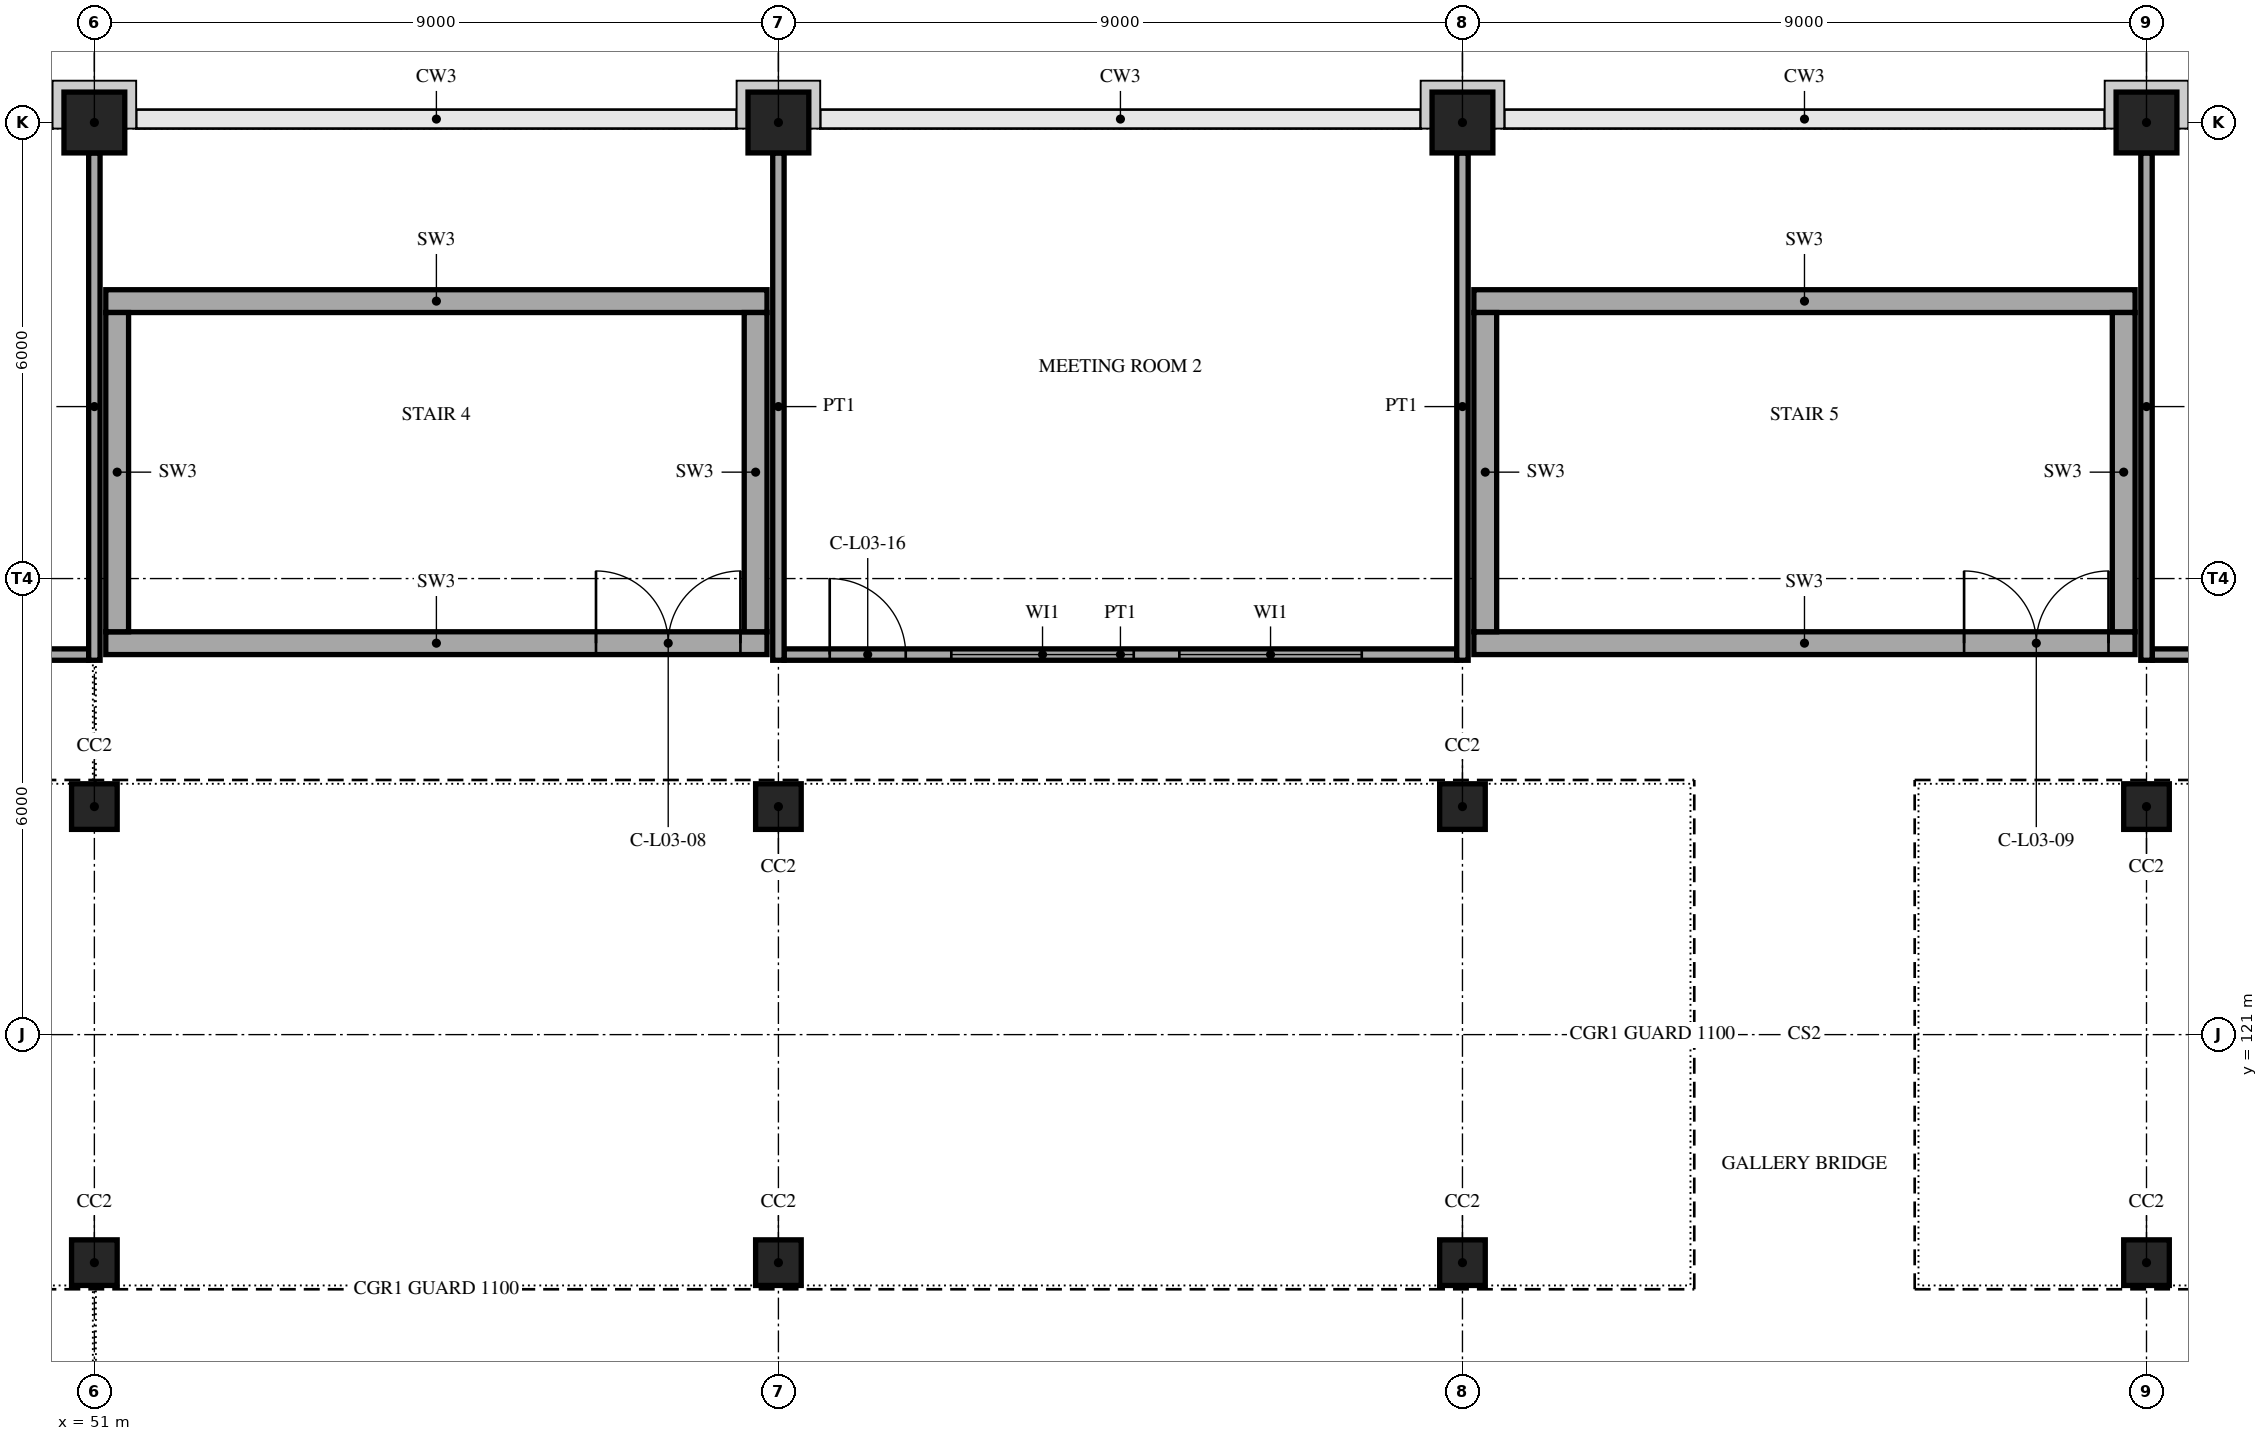
"""IFC4 building model, lengths in metres.
Left out: names, types, materials, properties, quantities, classifications, styles, units other than length and angle.
Written with IfcOpenShell. Run it as: python <this file> out.ifc"""

import sys

from ifc_helpers import new_model, si_unit, direction, frame, frame_2d, origin, origin_2d, place, context, subcontext, project, spatial, rectangle, extrude, element, fill, save


model = new_model("IFC4")
c1 = context("Model", 3, precision=1e-05, world=origin(), true_north=direction((0.0, 1.0)))
c2 = subcontext(c1, "Body", "Model", "MODEL_VIEW")
j1 = project(units=[si_unit("LENGTHUNIT", "METRE"), si_unit("PLANEANGLEUNIT", "RADIAN")], contexts=[c1])
p1 = place(None, origin())
s1 = spatial("IfcSite", under=j1, at=p1, CompositionType="ELEMENT")
p2 = place(p1, origin())
s2 = spatial("IfcBuilding", under=s1, at=p2, CompositionType="ELEMENT")
p3 = place(p2, frame((0.0, 0.0, 15.0)))
s3 = spatial("IfcBuildingStorey", under=s2, at=p3, CompositionType="ELEMENT", Elevation=15.0)
for number, where, z_axis, x_axis in (
    (1, (51.0, 118.0, 0.0), (0.0, 0.0, 1.0), (1.0, 0.0, 0.0)),
    (2, (51.0, 124.0, 0.0), (0.0, 0.0, 1.0), (1.0, 0.0, 0.0)),
):
    element("IfcColumn", number, at=place(p3, frame(where, z_axis=z_axis, x_axis=x_axis)), inside=s3, PredefinedType="COLUMN", context=c2, shape_type="SweptSolid", body=[
        extrude(rectangle(XDim=0.6, YDim=0.6, at=origin_2d()), origin(), (0.0, 0.0, 1.0), 4.2),
    ])
p4 = place(p3, frame((51.0, 133.0, 0.0), z_axis=(0.0, 0.0, 1.0), x_axis=(1.0, 0.0, 0.0)))
e3 = element("IfcColumn", 3, at=p4, inside=s3, PredefinedType="COLUMN", context=c2, shape_type="SweptSolid", body=[
    extrude(rectangle(XDim=0.8, YDim=0.8, at=origin_2d()), origin(), (0.0, 0.0, 1.0), 4.2),
])
for number, where, z_axis, x_axis in (
    (4, (60.0, 118.0, 0.0), (0.0, 0.0, 1.0), (1.0, 0.0, 0.0)),
    (5, (60.0, 124.0, 0.0), (0.0, 0.0, 1.0), (1.0, 0.0, 0.0)),
):
    element("IfcColumn", number, at=place(p3, frame(where, z_axis=z_axis, x_axis=x_axis)), inside=s3, PredefinedType="COLUMN", context=c2, shape_type="SweptSolid", body=[
        extrude(rectangle(XDim=0.6, YDim=0.6, at=origin_2d()), origin(), (0.0, 0.0, 1.0), 4.2),
    ])
p5 = place(p3, frame((60.0, 133.0, 0.0), z_axis=(0.0, 0.0, 1.0), x_axis=(1.0, 0.0, 0.0)))
e6 = element("IfcColumn", 6, at=p5, inside=s3, PredefinedType="COLUMN", context=c2, shape_type="SweptSolid", body=[
    extrude(rectangle(XDim=0.8, YDim=0.8, at=origin_2d()), origin(), (0.0, 0.0, 1.0), 4.2),
])
for number, where, z_axis, x_axis in (
    (7, (69.0, 118.0, 0.0), (0.0, 0.0, 1.0), (1.0, 0.0, 0.0)),
    (8, (69.0, 124.0, 0.0), (0.0, 0.0, 1.0), (1.0, 0.0, 0.0)),
):
    element("IfcColumn", number, at=place(p3, frame(where, z_axis=z_axis, x_axis=x_axis)), inside=s3, PredefinedType="COLUMN", context=c2, shape_type="SweptSolid", body=[
        extrude(rectangle(XDim=0.6, YDim=0.6, at=origin_2d()), origin(), (0.0, 0.0, 1.0), 4.2),
    ])
p6 = place(p3, frame((69.0, 133.0, 0.0), z_axis=(0.0, 0.0, 1.0), x_axis=(1.0, 0.0, 0.0)))
e9 = element("IfcColumn", 9, at=p6, inside=s3, PredefinedType="COLUMN", context=c2, shape_type="SweptSolid", body=[
    extrude(rectangle(XDim=0.8, YDim=0.8, at=origin_2d()), origin(), (0.0, 0.0, 1.0), 4.2),
])
for number, where, z_axis, x_axis in (
    (10, (78.0, 118.0, 0.0), (0.0, 0.0, 1.0), (1.0, 0.0, 0.0)),
    (11, (78.0, 124.0, 0.0), (0.0, 0.0, 1.0), (1.0, 0.0, 0.0)),
):
    element("IfcColumn", number, at=place(p3, frame(where, z_axis=z_axis, x_axis=x_axis)), inside=s3, PredefinedType="COLUMN", context=c2, shape_type="SweptSolid", body=[
        extrude(rectangle(XDim=0.6, YDim=0.6, at=origin_2d()), origin(), (0.0, 0.0, 1.0), 4.2),
    ])
p7 = place(p3, frame((78.0, 133.0, 0.0), z_axis=(0.0, 0.0, 1.0), x_axis=(1.0, 0.0, 0.0)))
e12 = element("IfcColumn", 12, at=p7, inside=s3, PredefinedType="COLUMN", context=c2, shape_type="SweptSolid", body=[
    extrude(rectangle(XDim=0.8, YDim=0.8, at=origin_2d()), origin(), (0.0, 0.0, 1.0), 4.2),
])
p8 = place(p3, frame((51.15, 126.15, 0.0), z_axis=(0.0, 0.0, 1.0), x_axis=(1.0, 0.0, 0.0)))
e13 = element("IfcWall", 13, at=p8, inside=s3, PredefinedType="SHEAR", context=c2, shape_type="SweptSolid", body=[
    extrude(rectangle(XDim=8.7, YDim=0.3, at=frame_2d((4.35, 0.0))), origin(), (0.0, 0.0, 1.0), 4.2),
])
p9 = place(p8, frame((6.45, 0.0, 0.0)))
e14 = element("IfcOpeningElement", 14, at=p9, cuts=e13, PredefinedType="OPENING", context=c2, shape_type="SweptSolid", body=[
    extrude(rectangle(XDim=1.9, YDim=2.1, at=frame_2d((0.95, 1.05))), frame((0.0, 0.16, 0.0), z_axis=(0.0, -1.0, 0.0), x_axis=(1.0, 0.0, 0.0)), (0.0, 0.0, 1.0), 0.32),
])
p10 = place(p3, frame((51.15, 130.65, 0.0), z_axis=(0.0, 0.0, 1.0), x_axis=(1.0, 0.0, 0.0)))
e15 = element("IfcWall", 15, at=p10, inside=s3, PredefinedType="SHEAR", context=c2, shape_type="SweptSolid", body=[
    extrude(rectangle(XDim=8.7, YDim=0.3, at=frame_2d((4.35, 0.0))), origin(), (0.0, 0.0, 1.0), 4.2),
])
for number, where, z_axis, x_axis in (
    (16, (51.3, 126.3, 0.0), (0.0, 0.0, 1.0), (0.0, 1.0, 0.0)),
    (17, (59.7, 126.3, 0.0), (0.0, 0.0, 1.0), (0.0, 1.0, 0.0)),
):
    element("IfcWall", number, at=place(p3, frame(where, z_axis=z_axis, x_axis=x_axis)), inside=s3, PredefinedType="SHEAR", context=c2, shape_type="SweptSolid", body=[
        extrude(rectangle(XDim=4.2, YDim=0.3, at=frame_2d((2.1, 0.0))), origin(), (0.0, 0.0, 1.0), 4.2),
    ])
p11 = place(p3, frame((69.15, 126.15, 0.0), z_axis=(0.0, 0.0, 1.0), x_axis=(1.0, 0.0, 0.0)))
e18 = element("IfcWall", 18, at=p11, inside=s3, PredefinedType="SHEAR", context=c2, shape_type="SweptSolid", body=[
    extrude(rectangle(XDim=8.7, YDim=0.3, at=frame_2d((4.35, 0.0))), origin(), (0.0, 0.0, 1.0), 4.2),
])
p12 = place(p11, frame((6.45, 0.0, 0.0)))
e19 = element("IfcOpeningElement", 19, at=p12, cuts=e18, PredefinedType="OPENING", context=c2, shape_type="SweptSolid", body=[
    extrude(rectangle(XDim=1.9, YDim=2.1, at=frame_2d((0.95, 1.05))), frame((0.0, 0.16, 0.0), z_axis=(0.0, -1.0, 0.0), x_axis=(1.0, 0.0, 0.0)), (0.0, 0.0, 1.0), 0.32),
])
p13 = place(p3, frame((69.15, 130.65, 0.0), z_axis=(0.0, 0.0, 1.0), x_axis=(1.0, 0.0, 0.0)))
e20 = element("IfcWall", 20, at=p13, inside=s3, PredefinedType="SHEAR", context=c2, shape_type="SweptSolid", body=[
    extrude(rectangle(XDim=8.7, YDim=0.3, at=frame_2d((4.35, 0.0))), origin(), (0.0, 0.0, 1.0), 4.2),
])
for number, where, z_axis, x_axis in (
    (21, (69.3, 126.3, 0.0), (0.0, 0.0, 1.0), (0.0, 1.0, 0.0)),
    (22, (77.7, 126.3, 0.0), (0.0, 0.0, 1.0), (0.0, 1.0, 0.0)),
):
    element("IfcWall", number, at=place(p3, frame(where, z_axis=z_axis, x_axis=x_axis)), inside=s3, PredefinedType="SHEAR", context=c2, shape_type="SweptSolid", body=[
        extrude(rectangle(XDim=4.2, YDim=0.3, at=frame_2d((2.1, 0.0))), origin(), (0.0, 0.0, 1.0), 4.2),
    ])
p14 = place(p3, frame((42.075, 126.0, 0.0), z_axis=(0.0, 0.0, 1.0), x_axis=(1.0, 0.0, 0.0)))
e23 = element("IfcWall", 23, at=p14, inside=s3, PredefinedType="PARTITIONING", context=c2, shape_type="SweptSolid", body=[
    extrude(rectangle(XDim=8.85, YDim=0.15, at=frame_2d((4.425, 0.0))), origin(), (0.0, 0.0, 1.0), 4.2),
])
p15 = place(p14, frame((0.6, 0.0, 0.0)))
e24 = element("IfcOpeningElement", 24, at=p15, cuts=e23, PredefinedType="OPENING", context=c2, shape_type="SweptSolid", body=[
    extrude(rectangle(XDim=1.0, YDim=2.1, at=frame_2d((0.5, 1.05))), frame((0.0, 0.085, 0.0), z_axis=(0.0, -1.0, 0.0), x_axis=(1.0, 0.0, 0.0)), (0.0, 0.0, 1.0), 0.17),
])
p16 = place(p14, frame((2.2, 0.0, 0.9)))
e25 = element("IfcOpeningElement", 25, at=p16, cuts=e23, PredefinedType="OPENING", context=c2, shape_type="SweptSolid", body=[
    extrude(rectangle(XDim=2.4, YDim=1.5, at=frame_2d((1.2, 0.75))), frame((0.0, 0.085, 0.0), z_axis=(0.0, -1.0, 0.0), x_axis=(1.0, 0.0, 0.0)), (0.0, 0.0, 1.0), 0.17),
])
p17 = place(p14, frame((5.2, 0.0, 0.9)))
e26 = element("IfcOpeningElement", 26, at=p17, cuts=e23, PredefinedType="OPENING", context=c2, shape_type="SweptSolid", body=[
    extrude(rectangle(XDim=2.4, YDim=1.5, at=frame_2d((1.2, 0.75))), frame((0.0, 0.085, 0.0), z_axis=(0.0, -1.0, 0.0), x_axis=(1.0, 0.0, 0.0)), (0.0, 0.0, 1.0), 0.17),
])
p18 = place(p3, frame((51.0, 125.925, 0.0), z_axis=(0.0, 0.0, 1.0), x_axis=(0.0, 1.0, 0.0)))
e27 = element("IfcWall", 27, at=p18, inside=s3, PredefinedType="PARTITIONING", context=c2, shape_type="SweptSolid", body=[
    extrude(rectangle(XDim=6.675, YDim=0.15, at=frame_2d((3.337, 0.0))), origin(), (0.0, 0.0, 1.0), 4.2),
])
p19 = place(p3, frame((60.075, 126.0, 0.0), z_axis=(0.0, 0.0, 1.0), x_axis=(1.0, 0.0, 0.0)))
e28 = element("IfcWall", 28, at=p19, inside=s3, PredefinedType="PARTITIONING", context=c2, shape_type="SweptSolid", body=[
    extrude(rectangle(XDim=8.85, YDim=0.15, at=frame_2d((4.425, 0.0))), origin(), (0.0, 0.0, 1.0), 4.2),
])
p20 = place(p19, frame((0.6, 0.0, 0.0)))
e29 = element("IfcOpeningElement", 29, at=p20, cuts=e28, PredefinedType="OPENING", context=c2, shape_type="SweptSolid", body=[
    extrude(rectangle(XDim=1.0, YDim=2.1, at=frame_2d((0.5, 1.05))), frame((0.0, 0.085, 0.0), z_axis=(0.0, -1.0, 0.0), x_axis=(1.0, 0.0, 0.0)), (0.0, 0.0, 1.0), 0.17),
])
p21 = place(p19, frame((2.2, 0.0, 0.9)))
e30 = element("IfcOpeningElement", 30, at=p21, cuts=e28, PredefinedType="OPENING", context=c2, shape_type="SweptSolid", body=[
    extrude(rectangle(XDim=2.4, YDim=1.5, at=frame_2d((1.2, 0.75))), frame((0.0, 0.085, 0.0), z_axis=(0.0, -1.0, 0.0), x_axis=(1.0, 0.0, 0.0)), (0.0, 0.0, 1.0), 0.17),
])
p22 = place(p19, frame((5.2, 0.0, 0.9)))
e31 = element("IfcOpeningElement", 31, at=p22, cuts=e28, PredefinedType="OPENING", context=c2, shape_type="SweptSolid", body=[
    extrude(rectangle(XDim=2.4, YDim=1.5, at=frame_2d((1.2, 0.75))), frame((0.0, 0.085, 0.0), z_axis=(0.0, -1.0, 0.0), x_axis=(1.0, 0.0, 0.0)), (0.0, 0.0, 1.0), 0.17),
])
for number, where, z_axis, x_axis in (
    (32, (60.0, 125.925, 0.0), (0.0, 0.0, 1.0), (0.0, 1.0, 0.0)),
    (33, (69.0, 125.925, 0.0), (0.0, 0.0, 1.0), (0.0, 1.0, 0.0)),
):
    element("IfcWall", number, at=place(p3, frame(where, z_axis=z_axis, x_axis=x_axis)), inside=s3, PredefinedType="PARTITIONING", context=c2, shape_type="SweptSolid", body=[
        extrude(rectangle(XDim=6.675, YDim=0.15, at=frame_2d((3.337, 0.0))), origin(), (0.0, 0.0, 1.0), 4.2),
    ])
p23 = place(p3, frame((78.075, 126.0, 0.0), z_axis=(0.0, 0.0, 1.0), x_axis=(1.0, 0.0, 0.0)))
e34 = element("IfcWall", 34, at=p23, inside=s3, PredefinedType="PARTITIONING", context=c2, shape_type="SweptSolid", body=[
    extrude(rectangle(XDim=8.85, YDim=0.15, at=frame_2d((4.425, 0.0))), origin(), (0.0, 0.0, 1.0), 4.2),
])
p24 = place(p23, frame((0.6, 0.0, 0.0)))
e35 = element("IfcOpeningElement", 35, at=p24, cuts=e34, PredefinedType="OPENING", context=c2, shape_type="SweptSolid", body=[
    extrude(rectangle(XDim=1.0, YDim=2.1, at=frame_2d((0.5, 1.05))), frame((0.0, 0.085, 0.0), z_axis=(0.0, -1.0, 0.0), x_axis=(1.0, 0.0, 0.0)), (0.0, 0.0, 1.0), 0.17),
])
p25 = place(p23, frame((2.2, 0.0, 0.9)))
e36 = element("IfcOpeningElement", 36, at=p25, cuts=e34, PredefinedType="OPENING", context=c2, shape_type="SweptSolid", body=[
    extrude(rectangle(XDim=2.4, YDim=1.5, at=frame_2d((1.2, 0.75))), frame((0.0, 0.085, 0.0), z_axis=(0.0, -1.0, 0.0), x_axis=(1.0, 0.0, 0.0)), (0.0, 0.0, 1.0), 0.17),
])
p26 = place(p23, frame((5.2, 0.0, 0.9)))
e37 = element("IfcOpeningElement", 37, at=p26, cuts=e34, PredefinedType="OPENING", context=c2, shape_type="SweptSolid", body=[
    extrude(rectangle(XDim=2.4, YDim=1.5, at=frame_2d((1.2, 0.75))), frame((0.0, 0.085, 0.0), z_axis=(0.0, -1.0, 0.0), x_axis=(1.0, 0.0, 0.0)), (0.0, 0.0, 1.0), 0.17),
])
p27 = place(p3, frame((78.0, 125.925, 0.0), z_axis=(0.0, 0.0, 1.0), x_axis=(0.0, 1.0, 0.0)))
e38 = element("IfcWall", 38, at=p27, inside=s3, PredefinedType="PARTITIONING", context=c2, shape_type="SweptSolid", body=[
    extrude(rectangle(XDim=6.675, YDim=0.15, at=frame_2d((3.337, 0.0))), origin(), (0.0, 0.0, 1.0), 4.2),
])
p28 = place(p9, origin())
e39 = element("IfcDoor", 39, at=p28, inside=s3, OperationType="DOUBLE_DOOR_SINGLE_SWING", PredefinedType="NOTDEFINED", context=c2, shape_type="SweptSolid", body=[
    extrude(rectangle(XDim=1.9, YDim=2.1, at=frame_2d((0.95, 1.05))), frame((0.0, 0.025, 0.0), z_axis=(0.0, -1.0, 0.0), x_axis=(1.0, 0.0, 0.0)), (0.0, 0.0, 1.0), 0.05),
])
fill(e14, e39)
p29 = place(p12, origin())
e40 = element("IfcDoor", 40, at=p29, inside=s3, OperationType="DOUBLE_DOOR_SINGLE_SWING", PredefinedType="NOTDEFINED", context=c2, shape_type="SweptSolid", body=[
    extrude(rectangle(XDim=1.9, YDim=2.1, at=frame_2d((0.95, 1.05))), frame((0.0, 0.025, 0.0), z_axis=(0.0, -1.0, 0.0), x_axis=(1.0, 0.0, 0.0)), (0.0, 0.0, 1.0), 0.05),
])
fill(e19, e40)
p30 = place(p20, origin())
e41 = element("IfcDoor", 41, at=p30, inside=s3, OperationType="SINGLE_SWING_LEFT", PredefinedType="NOTDEFINED", context=c2, shape_type="SweptSolid", body=[
    extrude(rectangle(XDim=1.0, YDim=2.1, at=frame_2d((0.5, 1.05))), frame((0.0, 0.025, 0.0), z_axis=(0.0, -1.0, 0.0), x_axis=(1.0, 0.0, 0.0)), (0.0, 0.0, 1.0), 0.05),
])
fill(e29, e41)
p31 = place(p21, origin())
e42 = element("IfcWindow", 42, at=p31, inside=s3, PartitioningType="SINGLE_PANEL", PredefinedType="WINDOW", context=c2, shape_type="SweptSolid", body=[
    extrude(rectangle(XDim=2.4, YDim=1.5, at=frame_2d((1.2, 0.75))), frame((0.0, 0.03, 0.0), z_axis=(0.0, -1.0, 0.0), x_axis=(1.0, 0.0, 0.0)), (0.0, 0.0, 1.0), 0.06),
])
fill(e30, e42)
p32 = place(p22, origin())
e43 = element("IfcWindow", 43, at=p32, inside=s3, PartitioningType="SINGLE_PANEL", PredefinedType="WINDOW", context=c2, shape_type="SweptSolid", body=[
    extrude(rectangle(XDim=2.4, YDim=1.5, at=frame_2d((1.2, 0.75))), frame((0.0, 0.03, 0.0), z_axis=(0.0, -1.0, 0.0), x_axis=(1.0, 0.0, 0.0)), (0.0, 0.0, 1.0), 0.06),
])
fill(e31, e43)
save(model, sys.argv[1])
